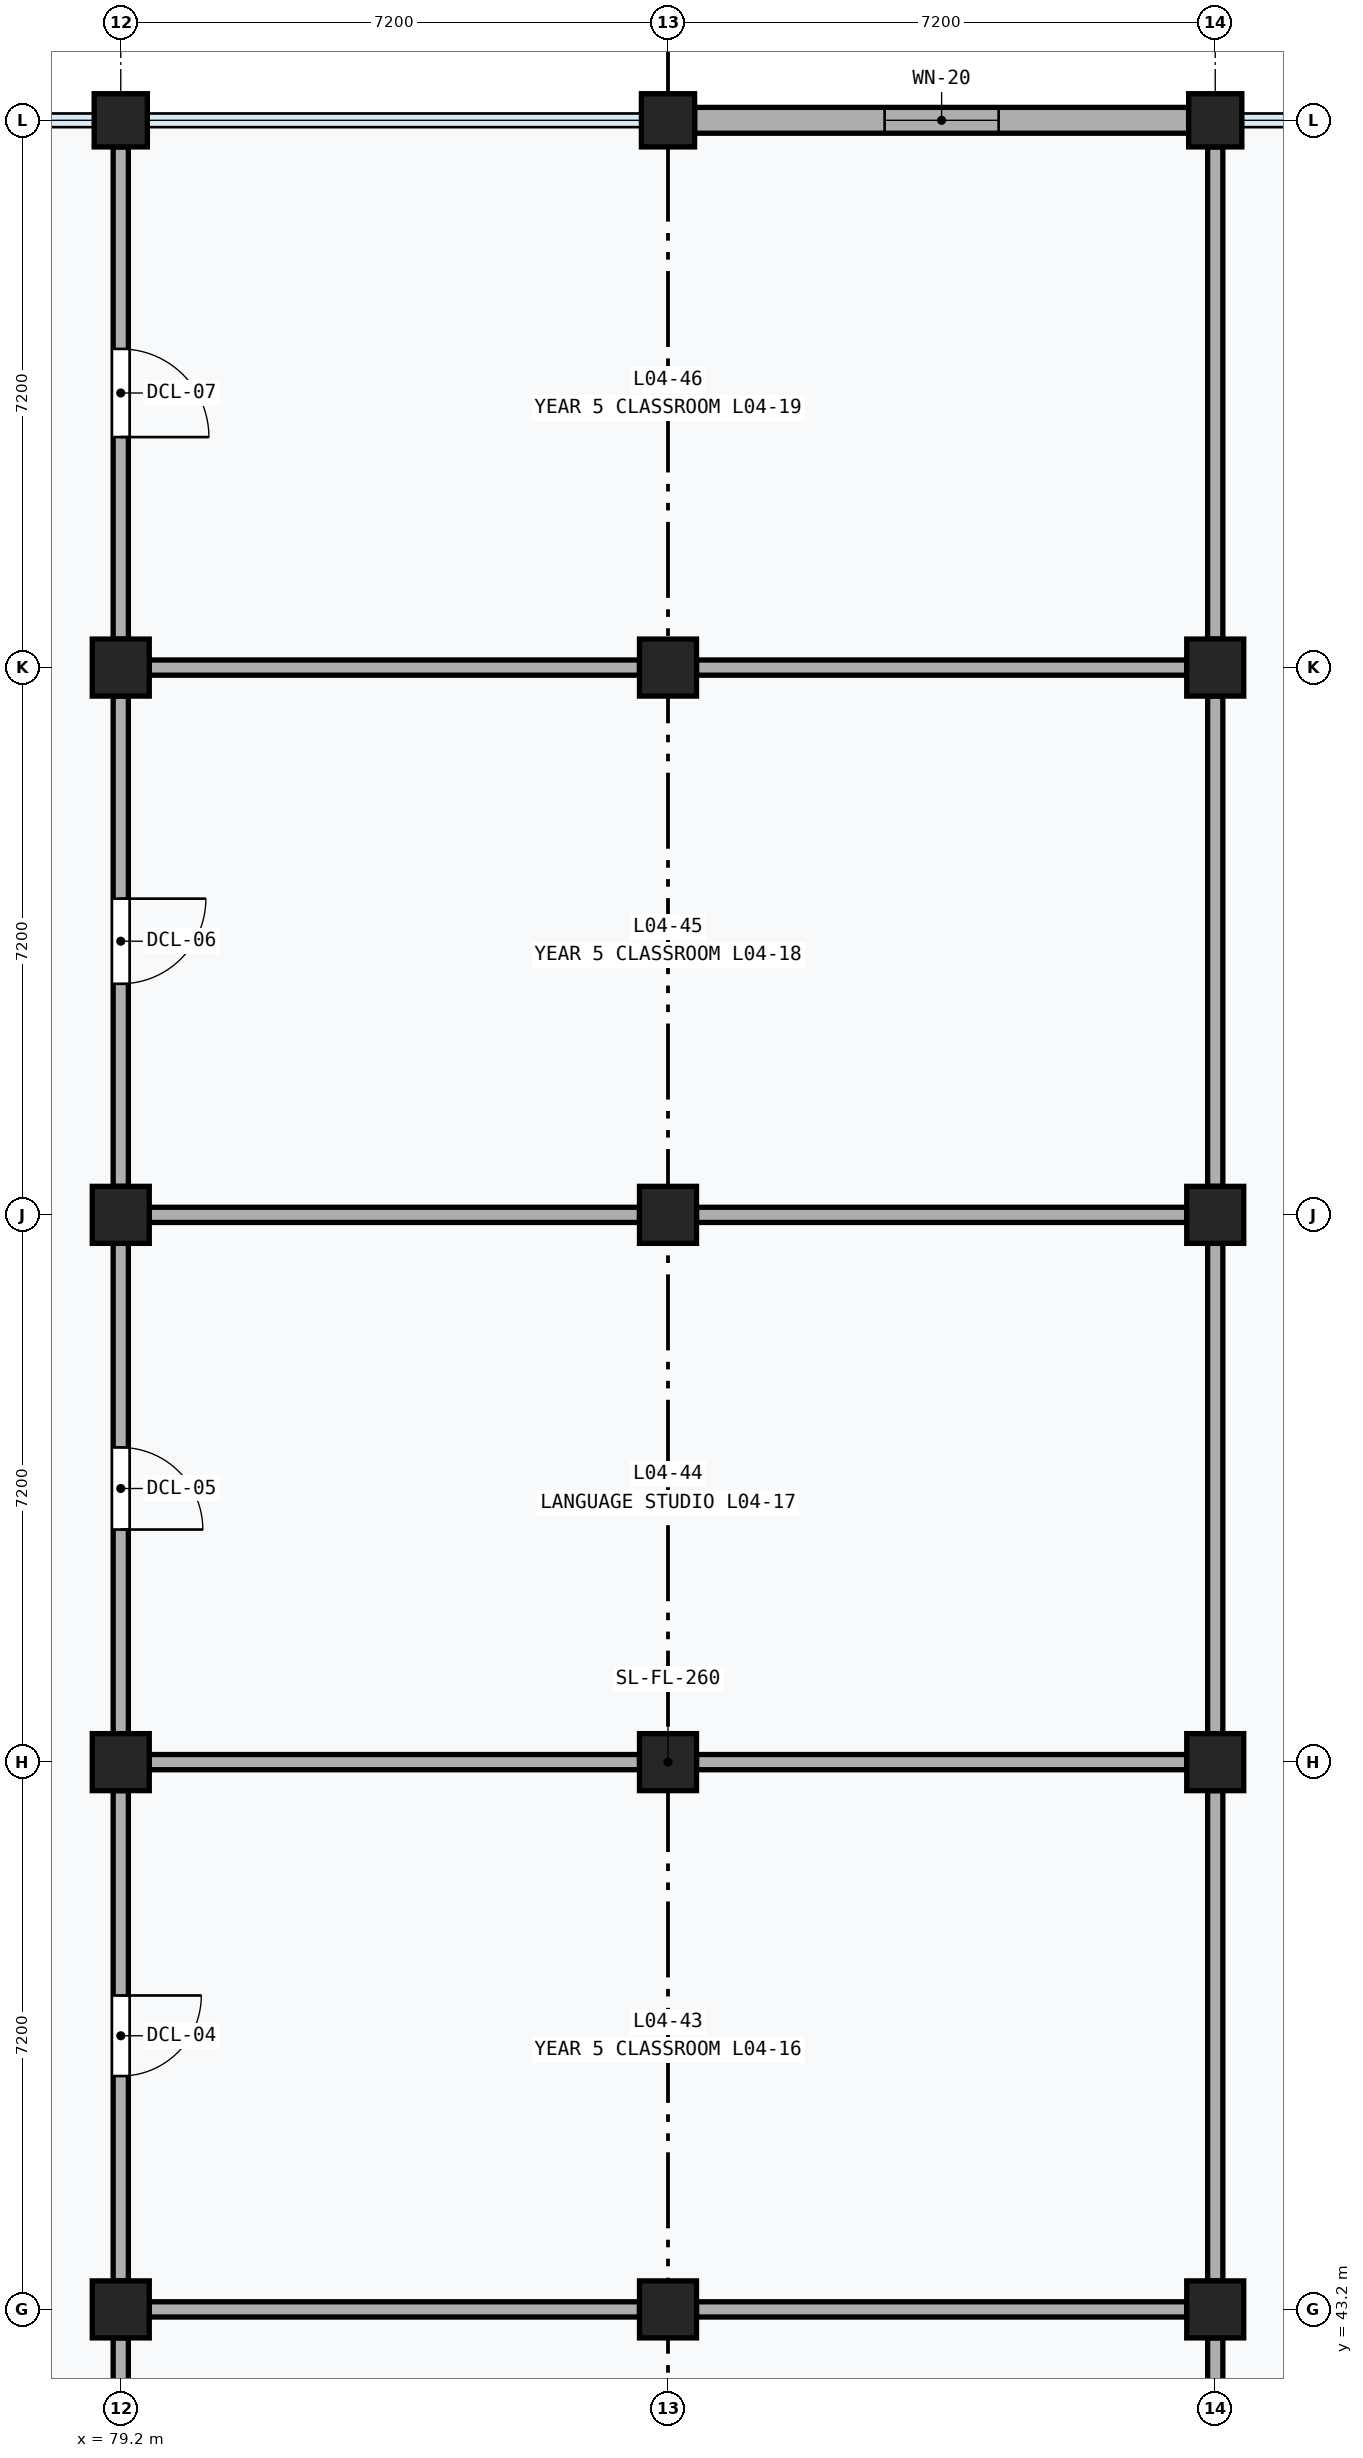
"""IFC4 building model, lengths in metres.
Left out: names, types, materials, properties, quantities, classifications, styles, units other than length and angle.
Written with IfcOpenShell. Run it as: python <this file> out.ifc"""

import sys

from ifc_helpers import new_model, si_unit, direction, frame, frame_2d, origin, origin_2d, place, context, subcontext, project, spatial, rectangle, extrude, element, fill, save


model = new_model("IFC4")
c1 = context("Model", 3, precision=1e-05, world=origin(), true_north=direction((0.0, 1.0)))
c2 = subcontext(c1, "Body", "Model", "MODEL_VIEW")
j1 = project(units=[si_unit("LENGTHUNIT", "METRE"), si_unit("PLANEANGLEUNIT", "RADIAN")], contexts=[c1])
p1 = place(None, origin())
s1 = spatial("IfcSite", under=j1, at=p1, CompositionType="ELEMENT")
p2 = place(p1, origin())
s2 = spatial("IfcBuilding", under=s1, at=p2, CompositionType="ELEMENT")
p3 = place(p2, frame((0.0, 0.0, 18.6)))
s3 = spatial("IfcBuildingStorey", under=s2, at=p3, CompositionType="ELEMENT", Elevation=18.6)
for number, where, z_axis, x_axis in (
    (1, (79.2, 43.2, 0.0), (0.0, 0.0, 1.0), (1.0, 0.0, 0.0)),
    (2, (79.2, 50.4, 0.0), (0.0, 0.0, 1.0), (1.0, 0.0, 0.0)),
    (3, (79.2, 57.6, 0.0), (0.0, 0.0, 1.0), (1.0, 0.0, 0.0)),
    (4, (79.2, 64.8, 0.0), (0.0, 0.0, 1.0), (1.0, 0.0, 0.0)),
):
    element("IfcColumn", number, at=place(p3, frame(where, z_axis=z_axis, x_axis=x_axis)), inside=s3, PredefinedType="COLUMN", context=c2, shape_type="SweptSolid", body=[
        extrude(rectangle(XDim=0.75, YDim=0.75, at=origin_2d()), origin(), (0.0, 0.0, 1.0), 4.0),
    ])
p4 = place(p3, frame((79.2, 72.0, 0.0), z_axis=(0.0, 0.0, 1.0), x_axis=(1.0, 0.0, 0.0)))
e5 = element("IfcColumn", 5, at=p4, inside=s3, PredefinedType="COLUMN", context=c2, shape_type="SweptSolid", body=[
    extrude(rectangle(XDim=0.7, YDim=0.7, at=origin_2d()), origin(), (0.0, 0.0, 1.0), 4.0),
])
for number, where, z_axis, x_axis in (
    (6, (86.4, 43.2, 0.0), (0.0, 0.0, 1.0), (1.0, 0.0, 0.0)),
    (7, (86.4, 50.4, 0.0), (0.0, 0.0, 1.0), (1.0, 0.0, 0.0)),
    (8, (86.4, 57.6, 0.0), (0.0, 0.0, 1.0), (1.0, 0.0, 0.0)),
    (9, (86.4, 64.8, 0.0), (0.0, 0.0, 1.0), (1.0, 0.0, 0.0)),
):
    element("IfcColumn", number, at=place(p3, frame(where, z_axis=z_axis, x_axis=x_axis)), inside=s3, PredefinedType="COLUMN", context=c2, shape_type="SweptSolid", body=[
        extrude(rectangle(XDim=0.75, YDim=0.75, at=origin_2d()), origin(), (0.0, 0.0, 1.0), 4.0),
    ])
p5 = place(p3, frame((86.4, 72.0, 0.0), z_axis=(0.0, 0.0, 1.0), x_axis=(1.0, 0.0, 0.0)))
e10 = element("IfcColumn", 10, at=p5, inside=s3, PredefinedType="COLUMN", context=c2, shape_type="SweptSolid", body=[
    extrude(rectangle(XDim=0.7, YDim=0.7, at=origin_2d()), origin(), (0.0, 0.0, 1.0), 4.0),
])
for number, where, z_axis, x_axis in (
    (11, (93.6, 43.2, 0.0), (0.0, 0.0, 1.0), (1.0, 0.0, 0.0)),
    (12, (93.6, 50.4, 0.0), (0.0, 0.0, 1.0), (1.0, 0.0, 0.0)),
    (13, (93.6, 57.6, 0.0), (0.0, 0.0, 1.0), (1.0, 0.0, 0.0)),
    (14, (93.6, 64.8, 0.0), (0.0, 0.0, 1.0), (1.0, 0.0, 0.0)),
):
    element("IfcColumn", number, at=place(p3, frame(where, z_axis=z_axis, x_axis=x_axis)), inside=s3, PredefinedType="COLUMN", context=c2, shape_type="SweptSolid", body=[
        extrude(rectangle(XDim=0.75, YDim=0.75, at=origin_2d()), origin(), (0.0, 0.0, 1.0), 4.0),
    ])
p6 = place(p3, frame((93.6, 72.0, 0.0), z_axis=(0.0, 0.0, 1.0), x_axis=(1.0, 0.0, 0.0)))
e15 = element("IfcColumn", 15, at=p6, inside=s3, PredefinedType="COLUMN", context=c2, shape_type="SweptSolid", body=[
    extrude(rectangle(XDim=0.7, YDim=0.7, at=origin_2d()), origin(), (0.0, 0.0, 1.0), 4.0),
])
p7 = place(p3, frame((86.75, 72.0, 0.0), z_axis=(0.0, 0.0, 1.0), x_axis=(1.0, 0.0, 0.0)))
e16 = element("IfcWall", 16, at=p7, inside=s3, PredefinedType="SOLIDWALL", context=c2, shape_type="SweptSolid", body=[
    extrude(rectangle(XDim=6.5, YDim=0.34, at=frame_2d((3.25, 0.0))), origin(), (0.0, 0.0, 1.0), 3.11),
])
p8 = place(p7, frame((2.5, 0.0, 1.1)))
e17 = element("IfcOpeningElement", 17, at=p8, cuts=e16, PredefinedType="OPENING", context=c2, shape_type="SweptSolid", body=[
    extrude(rectangle(XDim=1.5, YDim=1.35, at=frame_2d((0.75, 0.675))), frame((0.0, 0.182, 0.0), z_axis=(0.0, -1.0, 0.0), x_axis=(1.0, 0.0, 0.0)), (0.0, 0.0, 1.0), 0.364),
])
p9 = place(p3, frame((79.575, 43.2, 0.0), z_axis=(0.0, 0.0, 1.0), x_axis=(1.0, 0.0, 0.0)))
e18 = element("IfcWall", 18, at=p9, inside=s3, PredefinedType="PARTITIONING", context=c2, shape_type="SweptSolid", body=[
    extrude(rectangle(XDim=6.45, YDim=0.2, at=frame_2d((3.225, 0.0))), origin(), (0.0, 0.0, 1.0), 2.97),
])
p10 = place(p3, frame((79.2, 36.375, 0.0), z_axis=(0.0, 0.0, 1.0), x_axis=(0.0, 1.0, 0.0)))
e19 = element("IfcWall", 19, at=p10, inside=s3, PredefinedType="PARTITIONING", context=c2, shape_type="SweptSolid", body=[
    extrude(rectangle(XDim=6.45, YDim=0.2, at=frame_2d((3.225, 0.0))), origin(), (0.0, 0.0, 1.0), 2.97),
])
p11 = place(p10, frame((2.705, 0.0, 0.0)))
e20 = element("IfcOpeningElement", 20, at=p11, cuts=e19, PredefinedType="OPENING", context=c2, shape_type="SweptSolid", body=[
    extrude(rectangle(XDim=1.04, YDim=2.14, at=frame_2d((0.52, 1.07))), frame((0.0, 0.112, 0.0), z_axis=(0.0, -1.0, 0.0), x_axis=(1.0, 0.0, 0.0)), (0.0, 0.0, 1.0), 0.224),
])
p12 = place(p3, frame((86.775, 43.2, 0.0), z_axis=(0.0, 0.0, 1.0), x_axis=(1.0, 0.0, 0.0)))
e21 = element("IfcWall", 21, at=p12, inside=s3, PredefinedType="PARTITIONING", context=c2, shape_type="SweptSolid", body=[
    extrude(rectangle(XDim=6.45, YDim=0.2, at=frame_2d((3.225, 0.0))), origin(), (0.0, 0.0, 1.0), 2.97),
])
for number, where, z_axis, x_axis in (
    (22, (93.6, 36.375, 0.0), (0.0, 0.0, 1.0), (0.0, 1.0, 0.0)),
    (23, (79.575, 50.4, 0.0), (0.0, 0.0, 1.0), (1.0, 0.0, 0.0)),
):
    element("IfcWall", number, at=place(p3, frame(where, z_axis=z_axis, x_axis=x_axis)), inside=s3, PredefinedType="PARTITIONING", context=c2, shape_type="SweptSolid", body=[
        extrude(rectangle(XDim=6.45, YDim=0.2, at=frame_2d((3.225, 0.0))), origin(), (0.0, 0.0, 1.0), 2.97),
    ])
p13 = place(p3, frame((79.2, 43.575, 0.0), z_axis=(0.0, 0.0, 1.0), x_axis=(0.0, 1.0, 0.0)))
e24 = element("IfcWall", 24, at=p13, inside=s3, PredefinedType="PARTITIONING", context=c2, shape_type="SweptSolid", body=[
    extrude(rectangle(XDim=6.45, YDim=0.2, at=frame_2d((3.225, 0.0))), origin(), (0.0, 0.0, 1.0), 2.97),
])
p14 = place(p13, frame((2.695, 0.0, 0.0)))
e25 = element("IfcOpeningElement", 25, at=p14, cuts=e24, PredefinedType="OPENING", context=c2, shape_type="SweptSolid", body=[
    extrude(rectangle(XDim=1.06, YDim=2.16, at=frame_2d((0.53, 1.08))), frame((0.0, 0.112, 0.0), z_axis=(0.0, -1.0, 0.0), x_axis=(1.0, 0.0, 0.0)), (0.0, 0.0, 1.0), 0.224),
])
p15 = place(p3, frame((86.775, 50.4, 0.0), z_axis=(0.0, 0.0, 1.0), x_axis=(1.0, 0.0, 0.0)))
e26 = element("IfcWall", 26, at=p15, inside=s3, PredefinedType="PARTITIONING", context=c2, shape_type="SweptSolid", body=[
    extrude(rectangle(XDim=6.45, YDim=0.2, at=frame_2d((3.225, 0.0))), origin(), (0.0, 0.0, 1.0), 2.97),
])
for number, where, z_axis, x_axis in (
    (27, (93.6, 43.575, 0.0), (0.0, 0.0, 1.0), (0.0, 1.0, 0.0)),
    (28, (79.575, 57.6, 0.0), (0.0, 0.0, 1.0), (1.0, 0.0, 0.0)),
):
    element("IfcWall", number, at=place(p3, frame(where, z_axis=z_axis, x_axis=x_axis)), inside=s3, PredefinedType="PARTITIONING", context=c2, shape_type="SweptSolid", body=[
        extrude(rectangle(XDim=6.45, YDim=0.2, at=frame_2d((3.225, 0.0))), origin(), (0.0, 0.0, 1.0), 2.97),
    ])
p16 = place(p3, frame((79.2, 50.775, 0.0), z_axis=(0.0, 0.0, 1.0), x_axis=(0.0, 1.0, 0.0)))
e29 = element("IfcWall", 29, at=p16, inside=s3, PredefinedType="PARTITIONING", context=c2, shape_type="SweptSolid", body=[
    extrude(rectangle(XDim=6.45, YDim=0.2, at=frame_2d((3.225, 0.0))), origin(), (0.0, 0.0, 1.0), 2.97),
])
p17 = place(p16, frame((2.685, 0.0, 0.0)))
e30 = element("IfcOpeningElement", 30, at=p17, cuts=e29, PredefinedType="OPENING", context=c2, shape_type="SweptSolid", body=[
    extrude(rectangle(XDim=1.08, YDim=2.18, at=frame_2d((0.54, 1.09))), frame((0.0, 0.112, 0.0), z_axis=(0.0, -1.0, 0.0), x_axis=(1.0, 0.0, 0.0)), (0.0, 0.0, 1.0), 0.224),
])
p18 = place(p3, frame((86.775, 57.6, 0.0), z_axis=(0.0, 0.0, 1.0), x_axis=(1.0, 0.0, 0.0)))
e31 = element("IfcWall", 31, at=p18, inside=s3, PredefinedType="PARTITIONING", context=c2, shape_type="SweptSolid", body=[
    extrude(rectangle(XDim=6.45, YDim=0.2, at=frame_2d((3.225, 0.0))), origin(), (0.0, 0.0, 1.0), 3.04),
])
p19 = place(p3, frame((93.6, 50.775, 0.0), z_axis=(0.0, 0.0, 1.0), x_axis=(0.0, 1.0, 0.0)))
e32 = element("IfcWall", 32, at=p19, inside=s3, PredefinedType="PARTITIONING", context=c2, shape_type="SweptSolid", body=[
    extrude(rectangle(XDim=6.45, YDim=0.2, at=frame_2d((3.225, 0.0))), origin(), (0.0, 0.0, 1.0), 2.97),
])
p20 = place(p3, frame((79.575, 64.8, 0.0), z_axis=(0.0, 0.0, 1.0), x_axis=(1.0, 0.0, 0.0)))
e33 = element("IfcWall", 33, at=p20, inside=s3, PredefinedType="PARTITIONING", context=c2, shape_type="SweptSolid", body=[
    extrude(rectangle(XDim=6.45, YDim=0.2, at=frame_2d((3.225, 0.0))), origin(), (0.0, 0.0, 1.0), 3.04),
])
p21 = place(p3, frame((79.2, 57.975, 0.0), z_axis=(0.0, 0.0, 1.0), x_axis=(0.0, 1.0, 0.0)))
e34 = element("IfcWall", 34, at=p21, inside=s3, PredefinedType="PARTITIONING", context=c2, shape_type="SweptSolid", body=[
    extrude(rectangle(XDim=6.45, YDim=0.2, at=frame_2d((3.225, 0.0))), origin(), (0.0, 0.0, 1.0), 2.97),
])
p22 = place(p21, frame((2.665, 0.0, 0.0)))
e35 = element("IfcOpeningElement", 35, at=p22, cuts=e34, PredefinedType="OPENING", context=c2, shape_type="SweptSolid", body=[
    extrude(rectangle(XDim=1.12, YDim=2.2, at=frame_2d((0.56, 1.1))), frame((0.0, 0.112, 0.0), z_axis=(0.0, -1.0, 0.0), x_axis=(1.0, 0.0, 0.0)), (0.0, 0.0, 1.0), 0.224),
])
p23 = place(p3, frame((86.775, 64.8, 0.0), z_axis=(0.0, 0.0, 1.0), x_axis=(1.0, 0.0, 0.0)))
e36 = element("IfcWall", 36, at=p23, inside=s3, PredefinedType="PARTITIONING", context=c2, shape_type="SweptSolid", body=[
    extrude(rectangle(XDim=6.45, YDim=0.2, at=frame_2d((3.225, 0.0))), origin(), (0.0, 0.0, 1.0), 2.97),
])
p24 = place(p3, frame((93.6, 57.975, 0.0), z_axis=(0.0, 0.0, 1.0), x_axis=(0.0, 1.0, 0.0)))
e37 = element("IfcWall", 37, at=p24, inside=s3, PredefinedType="PARTITIONING", context=c2, shape_type="SweptSolid", body=[
    extrude(rectangle(XDim=6.45, YDim=0.2, at=frame_2d((3.225, 0.0))), origin(), (0.0, 0.0, 1.0), 2.97),
])
p25 = place(p3, frame((79.2, 65.175, 0.0), z_axis=(0.0, 0.0, 1.0), x_axis=(0.0, 1.0, 0.0)))
e38 = element("IfcWall", 38, at=p25, inside=s3, PredefinedType="PARTITIONING", context=c2, shape_type="SweptSolid", body=[
    extrude(rectangle(XDim=6.475, YDim=0.2, at=frame_2d((3.237, 0.0))), origin(), (0.0, 0.0, 1.0), 2.97),
])
p26 = place(p25, frame((2.657, 0.0, 0.0)))
e39 = element("IfcOpeningElement", 39, at=p26, cuts=e38, PredefinedType="OPENING", context=c2, shape_type="SweptSolid", body=[
    extrude(rectangle(XDim=1.16, YDim=2.22, at=frame_2d((0.58, 1.11))), frame((0.0, 0.112, 0.0), z_axis=(0.0, -1.0, 0.0), x_axis=(1.0, 0.0, 0.0)), (0.0, 0.0, 1.0), 0.224),
])
p27 = place(p3, frame((93.6, 65.175, 0.0), z_axis=(0.0, 0.0, 1.0), x_axis=(0.0, 1.0, 0.0)))
e40 = element("IfcWall", 40, at=p27, inside=s3, PredefinedType="PARTITIONING", context=c2, shape_type="SweptSolid", body=[
    extrude(rectangle(XDim=6.475, YDim=0.2, at=frame_2d((3.237, 0.0))), origin(), (0.0, 0.0, 1.0), 2.97),
])
p28 = place(p8, origin())
e41 = element("IfcWindow", 41, at=p28, inside=s3, PartitioningType="SINGLE_PANEL", PredefinedType="WINDOW", context=c2, shape_type="SweptSolid", body=[
    extrude(rectangle(XDim=1.5, YDim=1.35, at=frame_2d((0.75, 0.675))), frame((0.0, 0.03, 0.0), z_axis=(0.0, -1.0, 0.0), x_axis=(1.0, 0.0, 0.0)), (0.0, 0.0, 1.0), 0.06),
])
fill(e17, e41)
p29 = place(p14, frame((1.06, 0.0, 0.0), z_axis=(0.0, 0.0, 1.0), x_axis=(-1.0, 0.0, 0.0)))
e42 = element("IfcDoor", 42, at=p29, inside=s3, OperationType="SINGLE_SWING_LEFT", PredefinedType="DOOR", context=c2, shape_type="SweptSolid", body=[
    extrude(rectangle(XDim=1.06, YDim=2.16, at=frame_2d((0.53, 1.08))), frame((0.0, 0.025, 0.0), z_axis=(0.0, -1.0, 0.0), x_axis=(1.0, 0.0, 0.0)), (0.0, 0.0, 1.0), 0.05),
])
fill(e25, e42)
p30 = place(p17, frame((1.08, 0.0, 0.0), z_axis=(0.0, 0.0, 1.0), x_axis=(-1.0, 0.0, 0.0)))
e43 = element("IfcDoor", 43, at=p30, inside=s3, OperationType="SINGLE_SWING_RIGHT", PredefinedType="DOOR", context=c2, shape_type="SweptSolid", body=[
    extrude(rectangle(XDim=1.08, YDim=2.18, at=frame_2d((0.54, 1.09))), frame((0.0, 0.025, 0.0), z_axis=(0.0, -1.0, 0.0), x_axis=(1.0, 0.0, 0.0)), (0.0, 0.0, 1.0), 0.05),
])
fill(e30, e43)
p31 = place(p22, frame((1.12, 0.0, 0.0), z_axis=(0.0, 0.0, 1.0), x_axis=(-1.0, 0.0, 0.0)))
e44 = element("IfcDoor", 44, at=p31, inside=s3, OperationType="SINGLE_SWING_LEFT", PredefinedType="DOOR", context=c2, shape_type="SweptSolid", body=[
    extrude(rectangle(XDim=1.12, YDim=2.2, at=frame_2d((0.56, 1.1))), frame((0.0, 0.025, 0.0), z_axis=(0.0, -1.0, 0.0), x_axis=(1.0, 0.0, 0.0)), (0.0, 0.0, 1.0), 0.05),
])
fill(e35, e44)
p32 = place(p26, frame((1.16, 0.0, 0.0), z_axis=(0.0, 0.0, 1.0), x_axis=(-1.0, 0.0, 0.0)))
e45 = element("IfcDoor", 45, at=p32, inside=s3, OperationType="SINGLE_SWING_RIGHT", PredefinedType="DOOR", context=c2, shape_type="SweptSolid", body=[
    extrude(rectangle(XDim=1.16, YDim=2.22, at=frame_2d((0.58, 1.11))), frame((0.0, 0.025, 0.0), z_axis=(0.0, -1.0, 0.0), x_axis=(1.0, 0.0, 0.0)), (0.0, 0.0, 1.0), 0.05),
])
fill(e39, e45)
save(model, sys.argv[1])
